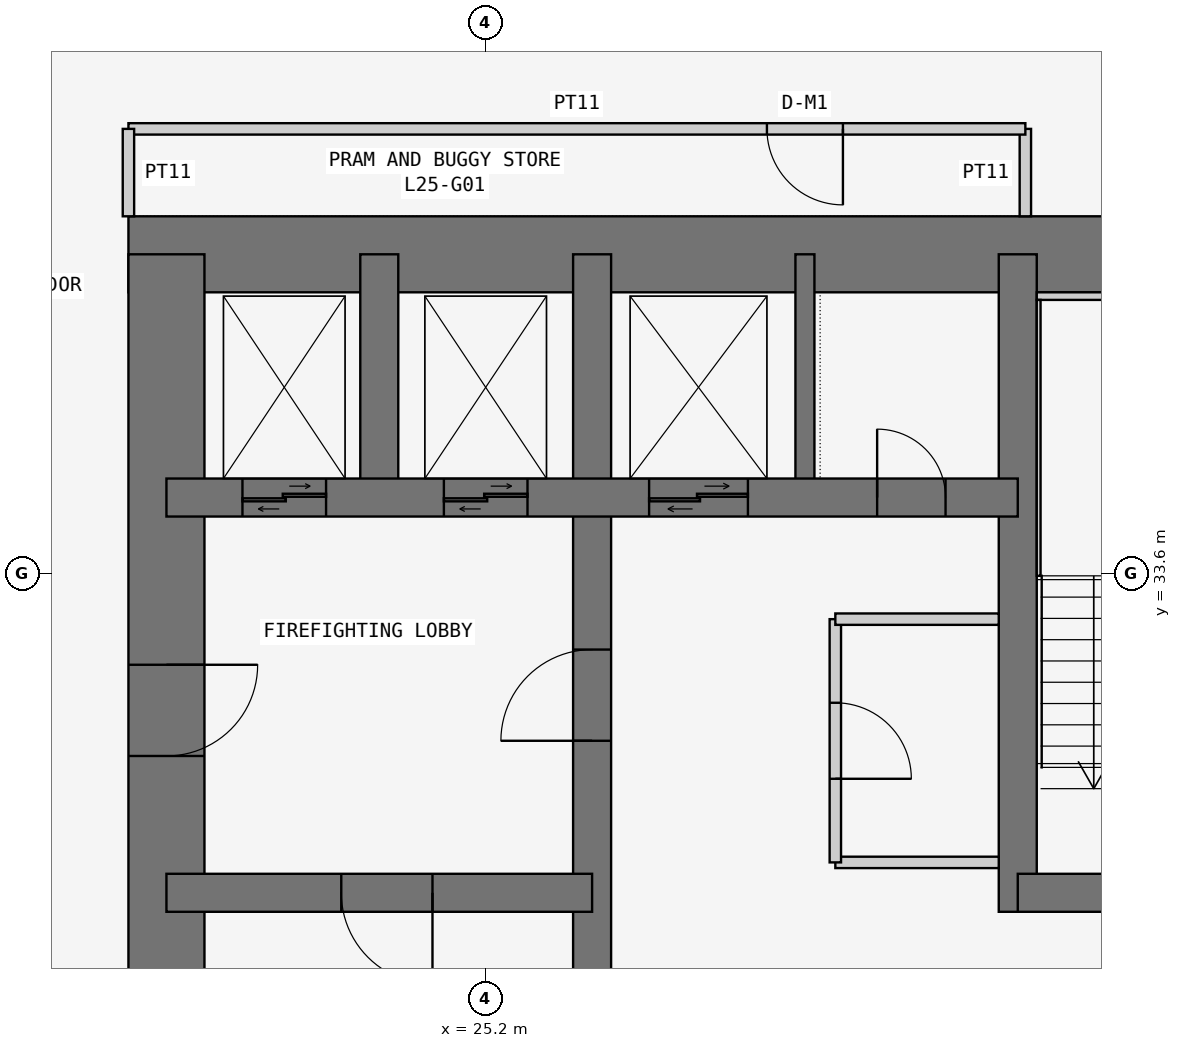
"""IFC4 building model, lengths in metres.
Left out: names, types, materials, properties, quantities, classifications, styles, units other than length and angle.
Written with IfcOpenShell. Run it as: python <this file> out.ifc"""

import sys

from ifc_helpers import new_model, si_unit, direction, frame, frame_2d, origin, place, context, subcontext, project, spatial, rectangle, extrude, element, fill, save


model = new_model("IFC4")
c1 = context("Model", 3, precision=1e-05, world=origin(), true_north=direction((0.0, 1.0)))
c2 = subcontext(c1, "Body", "Model", "MODEL_VIEW")
j1 = project(units=[si_unit("LENGTHUNIT", "METRE"), si_unit("PLANEANGLEUNIT", "RADIAN")], contexts=[c1])
p1 = place(None, origin())
s1 = spatial("IfcSite", under=j1, at=p1, CompositionType="ELEMENT")
p2 = place(p1, origin())
s2 = spatial("IfcBuilding", under=s1, at=p2, CompositionType="ELEMENT")
p3 = place(p2, frame((0.0, 0.0, 99.3)))
s3 = spatial("IfcBuildingStorey", under=s2, at=p3, CompositionType="ELEMENT", Elevation=99.3)
p4 = place(p3, frame((37.8, 37.8, 0.0), z_axis=(0.0, 0.0, 1.0), x_axis=(-1.0, 0.0, 0.0)))
e1 = element("IfcWall", 1, at=p4, inside=s3, PredefinedType="SHEAR", context=c2, shape_type="SweptSolid", body=[
    extrude(rectangle(XDim=17.3, YDim=1.0, at=frame_2d((8.65, 0.0))), origin(), (0.0, 0.0, 1.0), 3.6),
])
p5 = place(p3, frame((21.0, 37.8, 0.0), z_axis=(0.0, 0.0, 1.0), x_axis=(0.0, -1.0, 0.0)))
e2 = element("IfcWall", 2, at=p5, inside=s3, PredefinedType="SHEAR", context=c2, shape_type="SweptSolid", body=[
    extrude(rectangle(XDim=17.3, YDim=1.0, at=frame_2d((8.65, 0.0))), origin(), (0.0, 0.0, 1.0), 3.6),
])
p6 = place(p5, frame((5.4, 0.0, 0.0)))
e3 = element("IfcOpeningElement", 3, at=p6, cuts=e2, PredefinedType="OPENING", context=c2, shape_type="SweptSolid", body=[
    extrude(rectangle(XDim=1.2, YDim=2.1, at=frame_2d((0.6, 1.05))), frame((0.0, 0.51, 0.0), z_axis=(0.0, -1.0, 0.0), x_axis=(1.0, 0.0, 0.0)), (0.0, 0.0, 1.0), 1.02),
])
p7 = place(p3, frame((26.6, 21.0, 0.0), z_axis=(0.0, 0.0, 1.0), x_axis=(0.0, 1.0, 0.0)))
e4 = element("IfcWall", 4, at=p7, inside=s3, PredefinedType="SHEAR", context=c2, shape_type="SweptSolid", body=[
    extrude(rectangle(XDim=16.8, YDim=0.5, at=frame_2d((8.4, 0.0))), origin(), (0.0, 0.0, 1.0), 3.6),
])
p8 = place(p7, frame((10.4, 0.0, 0.0)))
e5 = element("IfcOpeningElement", 5, at=p8, cuts=e4, PredefinedType="OPENING", context=c2, shape_type="SweptSolid", body=[
    extrude(rectangle(XDim=1.2, YDim=2.1, at=frame_2d((0.6, 1.05))), frame((0.0, 0.26, 0.0), z_axis=(0.0, -1.0, 0.0), x_axis=(1.0, 0.0, 0.0)), (0.0, 0.0, 1.0), 0.52),
])
p9 = place(p3, frame((21.0, 29.4, 0.0), z_axis=(0.0, 0.0, 1.0), x_axis=(1.0, 0.0, 0.0)))
e6 = element("IfcWall", 6, at=p9, inside=s3, PredefinedType="SHEAR", context=c2, shape_type="SweptSolid", body=[
    extrude(rectangle(XDim=5.6, YDim=0.5, at=frame_2d((2.8, 0.0))), origin(), (0.0, 0.0, 1.0), 3.6),
])
p10 = place(p9, frame((2.3, 0.0, 0.0)))
e7 = element("IfcOpeningElement", 7, at=p10, cuts=e6, PredefinedType="OPENING", context=c2, shape_type="SweptSolid", body=[
    extrude(rectangle(XDim=1.2, YDim=2.1, at=frame_2d((0.6, 1.05))), frame((0.0, 0.26, 0.0), z_axis=(0.0, -1.0, 0.0), x_axis=(1.0, 0.0, 0.0)), (0.0, 0.0, 1.0), 0.52),
])
p11 = place(p3, frame((21.0, 34.6, 0.0), z_axis=(0.0, 0.0, 1.0), x_axis=(1.0, 0.0, 0.0)))
e8 = element("IfcWall", 8, at=p11, inside=s3, PredefinedType="SHEAR", context=c2, shape_type="SweptSolid", body=[
    extrude(rectangle(XDim=11.2, YDim=0.5, at=frame_2d((5.6, 0.0))), origin(), (0.0, 0.0, 1.0), 3.6),
])
p12 = place(p11, frame((9.35, 0.0, 0.0)))
e9 = element("IfcOpeningElement", 9, at=p12, cuts=e8, PredefinedType="OPENING", context=c2, shape_type="SweptSolid", body=[
    extrude(rectangle(XDim=0.9, YDim=2.1, at=frame_2d((0.45, 1.05))), frame((0.0, 0.26, 0.0), z_axis=(0.0, -1.0, 0.0), x_axis=(1.0, 0.0, 0.0)), (0.0, 0.0, 1.0), 0.52),
])
p13 = place(p11, frame((1.0, 0.0, 0.0)))
e10 = element("IfcOpeningElement", 10, at=p13, cuts=e8, PredefinedType="OPENING", context=c2, shape_type="SweptSolid", body=[
    extrude(rectangle(XDim=1.1, YDim=2.1, at=frame_2d((0.55, 1.05))), frame((0.0, 0.26, 0.0), z_axis=(0.0, -1.0, 0.0), x_axis=(1.0, 0.0, 0.0)), (0.0, 0.0, 1.0), 0.52),
])
p14 = place(p11, frame((3.65, 0.0, 0.0)))
e11 = element("IfcOpeningElement", 11, at=p14, cuts=e8, PredefinedType="OPENING", context=c2, shape_type="SweptSolid", body=[
    extrude(rectangle(XDim=1.1, YDim=2.1, at=frame_2d((0.55, 1.05))), frame((0.0, 0.26, 0.0), z_axis=(0.0, -1.0, 0.0), x_axis=(1.0, 0.0, 0.0)), (0.0, 0.0, 1.0), 0.52),
])
p15 = place(p11, frame((6.35, 0.0, 0.0)))
e12 = element("IfcOpeningElement", 12, at=p15, cuts=e8, PredefinedType="OPENING", context=c2, shape_type="SweptSolid", body=[
    extrude(rectangle(XDim=1.3, YDim=2.1, at=frame_2d((0.65, 1.05))), frame((0.0, 0.26, 0.0), z_axis=(0.0, -1.0, 0.0), x_axis=(1.0, 0.0, 0.0)), (0.0, 0.0, 1.0), 0.52),
])
p16 = place(p3, frame((23.8, 34.6, 0.0), z_axis=(0.0, 0.0, 1.0), x_axis=(0.0, 1.0, 0.0)))
e13 = element("IfcWall", 13, at=p16, inside=s3, PredefinedType="SHEAR", context=c2, shape_type="SweptSolid", body=[
    extrude(rectangle(XDim=3.2, YDim=0.5, at=frame_2d((1.6, 0.0))), origin(), (0.0, 0.0, 1.0), 3.6),
])
p17 = place(p3, frame((32.2, 29.15, 0.0), z_axis=(0.0, 0.0, 1.0), x_axis=(0.0, 1.0, 0.0)))
e14 = element("IfcWall", 14, at=p17, inside=s3, PredefinedType="SHEAR", context=c2, shape_type="SweptSolid", body=[
    extrude(rectangle(XDim=8.65, YDim=0.5, at=frame_2d((4.325, 0.0))), origin(), (0.0, 0.0, 1.0), 3.6),
])
p18 = place(p3, frame((32.2, 29.4, 0.0), z_axis=(0.0, 0.0, 1.0), x_axis=(1.0, 0.0, 0.0)))
e15 = element("IfcWall", 15, at=p18, inside=s3, PredefinedType="SHEAR", context=c2, shape_type="SweptSolid", body=[
    extrude(rectangle(XDim=5.6, YDim=0.5, at=frame_2d((2.8, 0.0))), origin(), (0.0, 0.0, 1.0), 3.6),
])
p19 = place(p18, frame((2.0, 0.0, 0.0)))
e16 = element("IfcOpeningElement", 16, at=p19, cuts=e15, PredefinedType="OPENING", context=c2, shape_type="SweptSolid", body=[
    extrude(rectangle(XDim=1.2, YDim=2.1, at=frame_2d((0.6, 1.05))), frame((0.0, 0.26, 0.0), z_axis=(0.0, -1.0, 0.0), x_axis=(1.0, 0.0, 0.0)), (0.0, 0.0, 1.0), 0.52),
])
p20 = place(p3, frame((29.4, 34.6, 0.0), z_axis=(0.0, 0.0, 1.0), x_axis=(0.0, 1.0, 0.0)))
e17 = element("IfcWall", 17, at=p20, inside=s3, PredefinedType="SHEAR", context=c2, shape_type="SweptSolid", body=[
    extrude(rectangle(XDim=3.2, YDim=0.25, at=frame_2d((1.6, 0.0))), origin(), (0.0, 0.0, 1.0), 3.6),
])
p21 = place(p3, frame((32.3, 38.3, 0.0), z_axis=(0.0, 0.0, 1.0), x_axis=(0.0, 1.0, 0.0)))
e18 = element("IfcWall", 18, at=p21, inside=s3, PredefinedType="PARTITIONING", context=c2, shape_type="SweptSolid", body=[
    extrude(rectangle(XDim=1.15, YDim=0.15, at=frame_2d((0.575, 0.0))), origin(), (0.0, 0.0, 1.0), 3.35),
])
p22 = place(p3, frame((32.3, 39.45, 0.0), z_axis=(0.0, 0.0, 1.0), x_axis=(-1.0, 0.0, 0.0)))
e19 = element("IfcWall", 19, at=p22, inside=s3, PredefinedType="PARTITIONING", context=c2, shape_type="SweptSolid", body=[
    extrude(rectangle(XDim=11.8, YDim=0.15, at=frame_2d((5.9, 0.0))), origin(), (0.0, 0.0, 1.0), 3.35),
])
p23 = place(p22, frame((2.4, 0.0, 0.0)))
e20 = element("IfcOpeningElement", 20, at=p23, cuts=e19, PredefinedType="OPENING", context=c2, shape_type="SweptSolid", body=[
    extrude(rectangle(XDim=1.0, YDim=2.1, at=frame_2d((0.5, 1.05))), frame((0.0, 0.085, 0.0), z_axis=(0.0, -1.0, 0.0), x_axis=(1.0, 0.0, 0.0)), (0.0, 0.0, 1.0), 0.17),
])
p24 = place(p3, frame((20.5, 39.45, 0.0), z_axis=(0.0, 0.0, 1.0), x_axis=(0.0, -1.0, 0.0)))
e21 = element("IfcWall", 21, at=p24, inside=s3, PredefinedType="PARTITIONING", context=c2, shape_type="SweptSolid", body=[
    extrude(rectangle(XDim=1.15, YDim=0.15, at=frame_2d((0.575, 0.0))), origin(), (0.0, 0.0, 1.0), 3.35),
])
p25 = place(p3, frame((31.95, 29.8, 0.0), z_axis=(0.0, 0.0, 1.0), x_axis=(-1.0, 0.0, 0.0)))
e22 = element("IfcWall", 22, at=p25, inside=s3, PredefinedType="PARTITIONING", context=c2, shape_type="SweptSolid", body=[
    extrude(rectangle(XDim=2.15, YDim=0.15, at=frame_2d((1.075, 0.0))), origin(), (0.0, 0.0, 1.0), 3.35),
])
p26 = place(p3, frame((29.8, 29.8, 0.0), z_axis=(0.0, 0.0, 1.0), x_axis=(0.0, 1.0, 0.0)))
e23 = element("IfcWall", 23, at=p26, inside=s3, PredefinedType="PARTITIONING", context=c2, shape_type="SweptSolid", body=[
    extrude(rectangle(XDim=3.2, YDim=0.15, at=frame_2d((1.6, 0.0))), origin(), (0.0, 0.0, 1.0), 3.35),
])
p27 = place(p26, frame((1.1, 0.0, 0.0)))
e24 = element("IfcOpeningElement", 24, at=p27, cuts=e23, PredefinedType="OPENING", context=c2, shape_type="SweptSolid", body=[
    extrude(rectangle(XDim=1.0, YDim=2.1, at=frame_2d((0.5, 1.05))), frame((0.0, 0.085, 0.0), z_axis=(0.0, -1.0, 0.0), x_axis=(1.0, 0.0, 0.0)), (0.0, 0.0, 1.0), 0.17),
])
p28 = place(p3, frame((29.8, 33.0, 0.0), z_axis=(0.0, 0.0, 1.0), x_axis=(1.0, 0.0, 0.0)))
e25 = element("IfcWall", 25, at=p28, inside=s3, PredefinedType="PARTITIONING", context=c2, shape_type="SweptSolid", body=[
    extrude(rectangle(XDim=2.15, YDim=0.15, at=frame_2d((1.075, 0.0))), origin(), (0.0, 0.0, 1.0), 3.35),
])
p29 = place(p3, frame((32.45, 37.25, 1.8), z_axis=(0.0, 0.0, 1.0), x_axis=(1.0, 0.0, 0.0)))
e26 = element("IfcWall", 26, at=p29, inside=s3, PredefinedType="PARTITIONING", context=c2, shape_type="SweptSolid", body=[
    extrude(rectangle(XDim=4.85, YDim=0.1, at=frame_2d((2.425, 0.0))), origin(), (0.0, 0.0, 1.0), 1.8),
])
p30 = place(p3, frame((32.475, 33.57, 1.8), z_axis=(0.0, 0.0, 1.0), x_axis=(0.0, 1.0, 0.0)))
e27 = element("IfcWall", 27, at=p30, inside=s3, PredefinedType="PARTITIONING", context=c2, shape_type="SweptSolid", body=[
    extrude(rectangle(XDim=3.63, YDim=0.05, at=frame_2d((1.815, 0.0))), origin(), (0.0, 0.0, 1.0), 1.8),
])
p31 = place(p23, origin())
e28 = element("IfcDoor", 28, at=p31, inside=s3, OperationType="SINGLE_SWING_LEFT", PredefinedType="DOOR", context=c2, shape_type="SweptSolid", body=[
    extrude(rectangle(XDim=1.0, YDim=2.1, at=frame_2d((0.5, 1.05))), frame((0.0, 0.025, 0.0), z_axis=(0.0, -1.0, 0.0), x_axis=(1.0, 0.0, 0.0)), (0.0, 0.0, 1.0), 0.05),
])
fill(e20, e28)
p32 = place(p6, origin())
e29 = element("IfcDoor", 29, at=p32, inside=s3, OperationType="SINGLE_SWING_LEFT", PredefinedType="DOOR", context=c2, shape_type="SweptSolid", body=[
    extrude(rectangle(XDim=1.2, YDim=2.1, at=frame_2d((0.6, 1.05))), frame((0.0, 0.025, 0.0), z_axis=(0.0, -1.0, 0.0), x_axis=(1.0, 0.0, 0.0)), (0.0, 0.0, 1.0), 0.05),
])
fill(e3, e29)
p33 = place(p10, frame((1.2, 0.0, 0.0), z_axis=(0.0, 0.0, 1.0), x_axis=(-1.0, 0.0, 0.0)))
e30 = element("IfcDoor", 30, at=p33, inside=s3, OperationType="SINGLE_SWING_LEFT", PredefinedType="DOOR", context=c2, shape_type="SweptSolid", body=[
    extrude(rectangle(XDim=1.2, YDim=2.1, at=frame_2d((0.6, 1.05))), frame((0.0, 0.025, 0.0), z_axis=(0.0, -1.0, 0.0), x_axis=(1.0, 0.0, 0.0)), (0.0, 0.0, 1.0), 0.05),
])
fill(e7, e30)
p34 = place(p8, origin())
e31 = element("IfcDoor", 31, at=p34, inside=s3, OperationType="SINGLE_SWING_LEFT", PredefinedType="DOOR", context=c2, shape_type="SweptSolid", body=[
    extrude(rectangle(XDim=1.2, YDim=2.1, at=frame_2d((0.6, 1.05))), frame((0.0, 0.025, 0.0), z_axis=(0.0, -1.0, 0.0), x_axis=(1.0, 0.0, 0.0)), (0.0, 0.0, 1.0), 0.05),
])
fill(e5, e31)
p35 = place(p12, origin())
e32 = element("IfcDoor", 32, at=p35, inside=s3, OperationType="SINGLE_SWING_LEFT", PredefinedType="DOOR", context=c2, shape_type="SweptSolid", body=[
    extrude(rectangle(XDim=0.9, YDim=2.1, at=frame_2d((0.45, 1.05))), frame((0.0, 0.025, 0.0), z_axis=(0.0, -1.0, 0.0), x_axis=(1.0, 0.0, 0.0)), (0.0, 0.0, 1.0), 0.05),
])
fill(e9, e32)
p36 = place(p27, frame((1.0, 0.0, 0.0), z_axis=(0.0, 0.0, 1.0), x_axis=(-1.0, 0.0, 0.0)))
e33 = element("IfcDoor", 33, at=p36, inside=s3, OperationType="SINGLE_SWING_RIGHT", PredefinedType="DOOR", context=c2, shape_type="SweptSolid", body=[
    extrude(rectangle(XDim=1.0, YDim=2.1, at=frame_2d((0.5, 1.05))), frame((0.0, 0.025, 0.0), z_axis=(0.0, -1.0, 0.0), x_axis=(1.0, 0.0, 0.0)), (0.0, 0.0, 1.0), 0.05),
])
fill(e24, e33)
p37 = place(p13, origin())
e34 = element("IfcDoor", 34, at=p37, inside=s3, OperationType="DOUBLE_DOOR_SLIDING", PredefinedType="DOOR", context=c2, shape_type="SweptSolid", body=[
    extrude(rectangle(XDim=1.1, YDim=2.1, at=frame_2d((0.55, 1.05))), frame((0.0, 0.025, 0.0), z_axis=(0.0, -1.0, 0.0), x_axis=(1.0, 0.0, 0.0)), (0.0, 0.0, 1.0), 0.05),
])
fill(e10, e34)
p38 = place(p14, origin())
e35 = element("IfcDoor", 35, at=p38, inside=s3, OperationType="DOUBLE_DOOR_SLIDING", PredefinedType="DOOR", context=c2, shape_type="SweptSolid", body=[
    extrude(rectangle(XDim=1.1, YDim=2.1, at=frame_2d((0.55, 1.05))), frame((0.0, 0.025, 0.0), z_axis=(0.0, -1.0, 0.0), x_axis=(1.0, 0.0, 0.0)), (0.0, 0.0, 1.0), 0.05),
])
fill(e11, e35)
p39 = place(p15, origin())
e36 = element("IfcDoor", 36, at=p39, inside=s3, OperationType="DOUBLE_DOOR_SLIDING", PredefinedType="DOOR", context=c2, shape_type="SweptSolid", body=[
    extrude(rectangle(XDim=1.3, YDim=2.1, at=frame_2d((0.65, 1.05))), frame((0.0, 0.025, 0.0), z_axis=(0.0, -1.0, 0.0), x_axis=(1.0, 0.0, 0.0)), (0.0, 0.0, 1.0), 0.05),
])
fill(e12, e36)
save(model, sys.argv[1])
